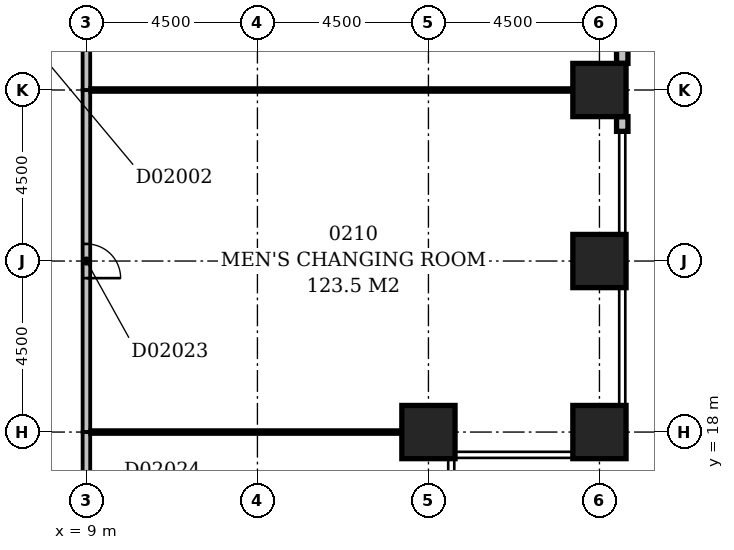
"""IFC4 building model, lengths in metres.
Left out: names, types, materials, properties, quantities, classifications, styles, units other than length and angle.
Written with IfcOpenShell. Run it as: python <this file> out.ifc"""

import sys

from ifc_helpers import new_model, si_unit, direction, frame, frame_2d, origin, origin_2d, place, context, subcontext, project, spatial, rectangle, extrude, element, fill, save


model = new_model("IFC4")
c1 = context("Model", 3, precision=1e-05, world=origin(), true_north=direction((0.0, 1.0)))
c2 = subcontext(c1, "Body", "Model", "MODEL_VIEW")
j1 = project(units=[si_unit("LENGTHUNIT", "METRE"), si_unit("PLANEANGLEUNIT", "RADIAN")], contexts=[c1])
p1 = place(None, origin())
s1 = spatial("IfcSite", under=j1, at=p1, CompositionType="ELEMENT")
p2 = place(p1, origin())
s2 = spatial("IfcBuilding", under=s1, at=p2, CompositionType="ELEMENT")
p3 = place(p2, frame((0.0, 0.0, 14.0)))
s3 = spatial("IfcBuildingStorey", under=s2, at=p3, CompositionType="ELEMENT", Elevation=14.0)
for number, where, z_axis, x_axis in (
    (1, (18.0, 18.0, -0.4), (0.0, 0.0, 1.0), (1.0, 0.0, 0.0)),
    (2, (22.5, 18.0, -0.4), (0.0, 0.0, 1.0), (1.0, 0.0, 0.0)),
    (3, (22.5, 22.5, -0.4), (0.0, 0.0, 1.0), (1.0, 0.0, 0.0)),
    (4, (22.5, 27.0, -0.4), (0.0, 0.0, 1.0), (1.0, 0.0, 0.0)),
):
    element("IfcColumn", number, at=place(p3, frame(where, z_axis=z_axis, x_axis=x_axis)), inside=s3, PredefinedType="COLUMN", context=c2, shape_type="SweptSolid", body=[
        extrude(rectangle(XDim=1.4, YDim=1.4, at=origin_2d()), origin(), (0.0, 0.0, 1.0), 5.0),
    ])
p4 = place(p3, frame((23.1, 25.912, 0.0), z_axis=(0.0, 0.0, 1.0), x_axis=(0.0, 1.0, 0.0)))
e5 = element("IfcWall", 5, at=p4, inside=s3, PredefinedType="STANDARD", context=c2, shape_type="SweptSolid", body=[
    extrude(rectangle(XDim=0.388, YDim=0.3, at=frame_2d((0.194, 0.0))), origin(), (0.0, 0.0, 1.0), 3.9),
])
p5 = place(p3, frame((23.1, 27.7, 0.0), z_axis=(0.0, 0.0, 1.0), x_axis=(0.0, 1.0, 0.0)))
e6 = element("IfcWall", 6, at=p5, inside=s3, PredefinedType="STANDARD", context=c2, shape_type="SweptSolid", body=[
    extrude(rectangle(XDim=1.369, YDim=0.3, at=frame_2d((0.684, 0.0))), origin(), (0.0, 0.0, 1.0), 3.9),
])
p6 = place(p3, frame((9.0, 9.1, 0.0), z_axis=(0.0, 0.0, 1.0), x_axis=(0.0, 1.0, 0.0)))
e7 = element("IfcWall", 7, at=p6, inside=s3, PredefinedType="PARTITIONING", context=c2, shape_type="SweptSolid", body=[
    extrude(rectangle(XDim=8.9, YDim=0.2, at=frame_2d((4.45, 0.0))), origin(), (0.0, 0.0, 1.0), 4.6),
])
p7 = place(p6, frame((4.025, 0.0, 0.0)))
e8 = element("IfcOpeningElement", 8, at=p7, cuts=e7, PredefinedType="OPENING", context=c2, shape_type="SweptSolid", body=[
    extrude(rectangle(XDim=0.9, YDim=2.1, at=frame_2d((0.45, 1.05))), frame((0.0, 0.112, 0.0), z_axis=(0.0, -1.0, 0.0), x_axis=(1.0, 0.0, 0.0)), (0.0, 0.0, 1.0), 0.224),
])
p8 = place(p3, frame((9.0, 18.0, 0.0), z_axis=(0.0, 0.0, 1.0), x_axis=(0.0, 1.0, 0.0)))
e9 = element("IfcWall", 9, at=p8, inside=s3, PredefinedType="PARTITIONING", context=c2, shape_type="SweptSolid", body=[
    extrude(rectangle(XDim=9.0, YDim=0.2, at=frame_2d((4.5, 0.0))), origin(), (0.0, 0.0, 1.0), 4.6),
])
p9 = place(p8, frame((4.05, 0.0, 0.0)))
e10 = element("IfcOpeningElement", 10, at=p9, cuts=e9, PredefinedType="OPENING", context=c2, shape_type="SweptSolid", body=[
    extrude(rectangle(XDim=0.9, YDim=2.1, at=frame_2d((0.45, 1.05))), frame((0.0, 0.112, 0.0), z_axis=(0.0, -1.0, 0.0), x_axis=(1.0, 0.0, 0.0)), (0.0, 0.0, 1.0), 0.224),
])
p10 = place(p3, frame((18.0, 18.0, 0.0), z_axis=(0.0, 0.0, 1.0), x_axis=(-1.0, 0.0, 0.0)))
e11 = element("IfcWall", 11, at=p10, inside=s3, PredefinedType="PARTITIONING", context=c2, shape_type="SweptSolid", body=[
    extrude(rectangle(XDim=8.9, YDim=0.1, at=frame_2d((4.45, 0.0))), origin(), (0.0, 0.0, 1.0), 3.9),
])
p11 = place(p3, frame((18.7, 18.0, 0.0), z_axis=(0.0, 0.0, 1.0), x_axis=(-1.0, 0.0, 0.0)))
e12 = element("IfcWall", 12, at=p11, inside=s3, PredefinedType="PARTITIONING", context=c2, shape_type="SweptSolid", body=[
    extrude(rectangle(XDim=0.7, YDim=0.1, at=frame_2d((0.35, 0.0))), origin(), (0.0, 0.0, 1.0), 3.9),
])
p12 = place(p3, frame((9.0, 27.0, 0.0), z_axis=(0.0, 0.0, 1.0), x_axis=(0.0, 1.0, 0.0)))
e13 = element("IfcWall", 13, at=p12, inside=s3, PredefinedType="PARTITIONING", context=c2, shape_type="SweptSolid", body=[
    extrude(rectangle(XDim=9.0, YDim=0.2, at=frame_2d((4.5, 0.0))), origin(), (0.0, 0.0, 1.0), 4.6),
])
p13 = place(p12, frame((4.05, 0.0, 0.0)))
e14 = element("IfcOpeningElement", 14, at=p13, cuts=e13, PredefinedType="OPENING", context=c2, shape_type="SweptSolid", body=[
    extrude(rectangle(XDim=0.9, YDim=2.1, at=frame_2d((0.45, 1.05))), frame((0.0, 0.112, 0.0), z_axis=(0.0, -1.0, 0.0), x_axis=(1.0, 0.0, 0.0)), (0.0, 0.0, 1.0), 0.224),
])
p14 = place(p3, frame((22.5, 27.0, 0.0), z_axis=(0.0, 0.0, 1.0), x_axis=(-1.0, 0.0, 0.0)))
e15 = element("IfcWall", 15, at=p14, inside=s3, PredefinedType="PARTITIONING", context=c2, shape_type="SweptSolid", body=[
    extrude(rectangle(XDim=13.4, YDim=0.1, at=frame_2d((6.7, 0.0))), origin(), (0.0, 0.0, 1.0), 4.0),
])
p15 = place(p9, frame((0.9, 0.0, 0.0), z_axis=(0.0, 0.0, 1.0), x_axis=(-1.0, 0.0, 0.0)))
e16 = element("IfcDoor", 16, at=p15, inside=s3, OperationType="SINGLE_SWING_RIGHT", PredefinedType="DOOR", context=c2, shape_type="SweptSolid", body=[
    extrude(rectangle(XDim=0.9, YDim=2.1, at=frame_2d((0.45, 1.05))), frame((0.0, 0.025, 0.0), z_axis=(0.0, -1.0, 0.0), x_axis=(1.0, 0.0, 0.0)), (0.0, 0.0, 1.0), 0.05),
])
fill(e10, e16)
save(model, sys.argv[1])
